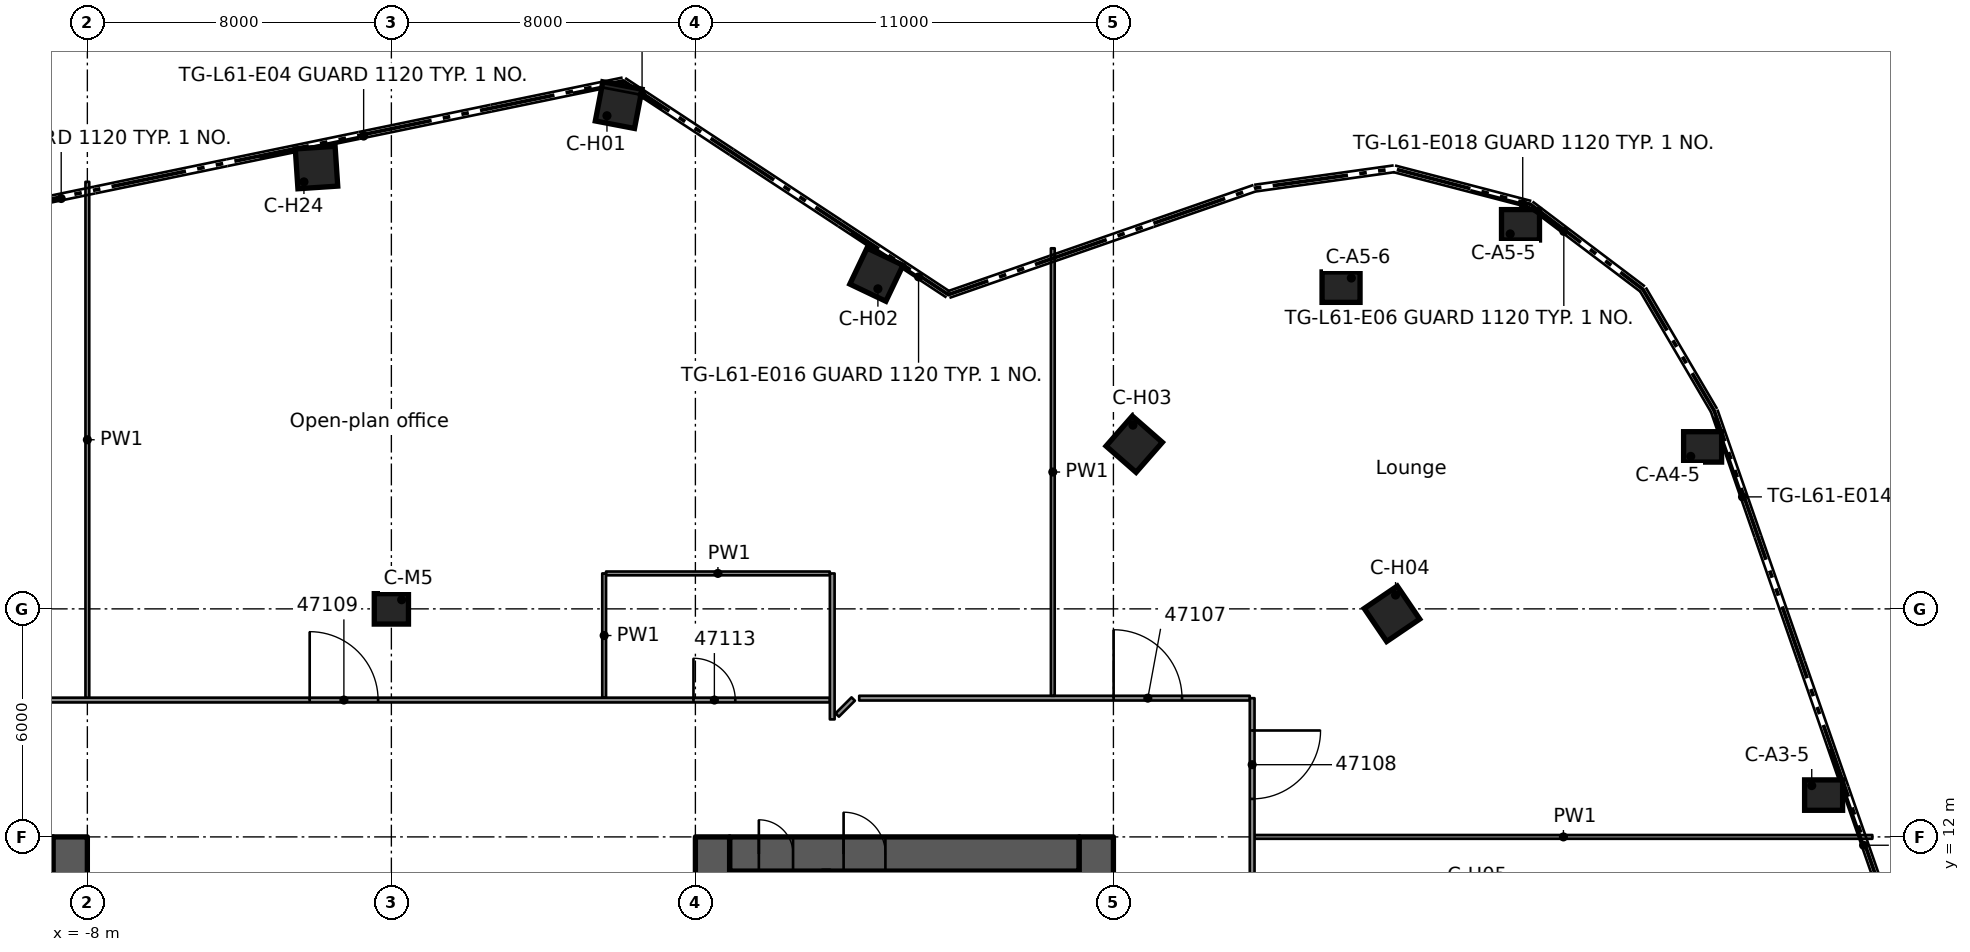
"""IFC4 building model, lengths in metres.
Left out: names, types, materials, properties, quantities, classifications, styles, units other than length and angle.
Written with IfcOpenShell. Run it as: python <this file> out.ifc"""

import sys

from ifc_helpers import new_model, si_unit, direction, frame, frame_2d, origin, origin_2d, place, context, subcontext, project, spatial, rectangle, extrude, element, fill, save


model = new_model("IFC4")
c1 = context("Model", 3, precision=1e-05, world=origin(), true_north=direction((0.0, 1.0)))
c2 = subcontext(c1, "Body", "Model", "MODEL_VIEW")
j1 = project(units=[si_unit("LENGTHUNIT", "METRE"), si_unit("PLANEANGLEUNIT", "RADIAN")], contexts=[c1])
p1 = place(None, origin())
s1 = spatial("IfcSite", under=j1, at=p1, CompositionType="ELEMENT")
p2 = place(p1, origin())
s2 = spatial("IfcBuilding", under=s1, at=p2, CompositionType="ELEMENT")
p3 = place(p2, frame((0.0, 0.0, 232.0)))
s3 = spatial("IfcBuildingStorey", under=s2, at=p3, CompositionType="ELEMENT", Elevation=232.0)
p4 = place(p3, frame((-18.1, 11.55, 0.0), z_axis=(0.0, 0.0, 1.0), x_axis=(1.0, 0.0, 0.0)))
e1 = element("IfcWall", 1, at=p4, inside=s3, PredefinedType="SHEAR", context=c2, shape_type="SweptSolid", body=[
    extrude(rectangle(XDim=9.2, YDim=0.9, at=frame_2d((4.6, 0.0))), origin(), (0.0, 0.0, 1.0), 3.5),
])
p5 = place(p4, frame((5.1, 0.0, 0.0)))
e2 = element("IfcOpeningElement", 2, at=p5, cuts=e1, PredefinedType="OPENING", context=c2, shape_type="SweptSolid", body=[
    extrude(rectangle(XDim=1.1, YDim=2.1, at=frame_2d((0.55, 1.05))), frame((0.0, 0.46, 0.0), z_axis=(0.0, -1.0, 0.0), x_axis=(1.0, 0.0, 0.0)), (0.0, 0.0, 1.0), 0.92),
])
p6 = place(p3, frame((-8.45, -12.0, 0.0), z_axis=(0.0, 0.0, 1.0), x_axis=(0.0, 1.0, 0.0)))
e3 = element("IfcWall", 3, at=p6, inside=s3, PredefinedType="SHEAR", context=c2, shape_type="SweptSolid", body=[
    extrude(rectangle(XDim=24.0, YDim=0.9, at=frame_2d((12.0, 0.0))), origin(), (0.0, 0.0, 1.0), 3.5),
])
p7 = place(p6, frame((9.6, 0.0, 0.0)))
e4 = element("IfcOpeningElement", 4, at=p7, cuts=e3, PredefinedType="OPENING", context=c2, shape_type="SweptSolid", body=[
    extrude(rectangle(XDim=1.8, YDim=2.1, at=frame_2d((0.9, 1.05))), frame((0.0, 0.46, 0.0), z_axis=(0.0, -1.0, 0.0), x_axis=(1.0, 0.0, 0.0)), (0.0, 0.0, 1.0), 0.92),
])
p8 = place(p6, frame((19.65, 0.0, 0.0)))
e5 = element("IfcOpeningElement", 5, at=p8, cuts=e3, PredefinedType="OPENING", context=c2, shape_type="SweptSolid", body=[
    extrude(rectangle(XDim=1.1, YDim=2.1, at=frame_2d((0.55, 1.05))), frame((0.0, 0.46, 0.0), z_axis=(0.0, -1.0, 0.0), x_axis=(1.0, 0.0, 0.0)), (0.0, 0.0, 1.0), 0.92),
])
p9 = place(p6, frame((2.2, 0.0, 0.0)))
e6 = element("IfcOpeningElement", 6, at=p9, cuts=e3, PredefinedType="OPENING", context=c2, shape_type="SweptSolid", body=[
    extrude(rectangle(XDim=0.8, YDim=2.1, at=frame_2d((0.4, 1.05))), frame((0.0, 0.46, 0.0), z_axis=(0.0, -1.0, 0.0), x_axis=(1.0, 0.0, 0.0)), (0.0, 0.0, 1.0), 0.92),
])
p10 = place(p3, frame((8.9, 11.55, 0.0), z_axis=(0.0, 0.0, 1.0), x_axis=(1.0, 0.0, 0.0)))
e7 = element("IfcWall", 7, at=p10, inside=s3, PredefinedType="SHEAR", context=c2, shape_type="SweptSolid", body=[
    extrude(rectangle(XDim=9.2, YDim=0.9, at=frame_2d((4.6, 0.0))), origin(), (0.0, 0.0, 1.0), 3.5),
])
p11 = place(p10, frame((3.0, 0.0, 0.0)))
e8 = element("IfcOpeningElement", 8, at=p11, cuts=e7, PredefinedType="OPENING", context=c2, shape_type="SweptSolid", body=[
    extrude(rectangle(XDim=1.1, YDim=2.1, at=frame_2d((0.55, 1.05))), frame((0.0, 0.46, 0.0), z_axis=(0.0, -1.0, 0.0), x_axis=(1.0, 0.0, 0.0)), (0.0, 0.0, 1.0), 0.92),
])
p12 = place(p10, frame((0.77, 0.0, 0.0)))
e9 = element("IfcOpeningElement", 9, at=p12, cuts=e7, PredefinedType="OPENING", context=c2, shape_type="SweptSolid", body=[
    extrude(rectangle(XDim=0.9, YDim=2.1, at=frame_2d((0.45, 1.05))), frame((0.0, 0.46, 0.0), z_axis=(0.0, -1.0, 0.0), x_axis=(1.0, 0.0, 0.0)), (0.0, 0.0, 1.0), 0.92),
])
p13 = place(p3, frame((8.45, -12.0, 0.0), z_axis=(0.0, 0.0, 1.0), x_axis=(0.0, 1.0, 0.0)))
e10 = element("IfcWall", 10, at=p13, inside=s3, PredefinedType="SHEAR", context=c2, shape_type="SweptSolid", body=[
    extrude(rectangle(XDim=24.0, YDim=0.9, at=frame_2d((12.0, 0.0))), origin(), (0.0, 0.0, 1.0), 3.5),
])
p14 = place(p13, frame((12.6, 0.0, 0.0)))
e11 = element("IfcOpeningElement", 11, at=p14, cuts=e10, PredefinedType="OPENING", context=c2, shape_type="SweptSolid", body=[
    extrude(rectangle(XDim=1.8, YDim=2.1, at=frame_2d((0.9, 1.05))), frame((0.0, 0.46, 0.0), z_axis=(0.0, -1.0, 0.0), x_axis=(1.0, 0.0, 0.0)), (0.0, 0.0, 1.0), 0.92),
])
p15 = place(p13, frame((3.25, 0.0, 0.0)))
e12 = element("IfcOpeningElement", 12, at=p15, cuts=e10, PredefinedType="OPENING", context=c2, shape_type="SweptSolid", body=[
    extrude(rectangle(XDim=1.1, YDim=2.1, at=frame_2d((0.55, 1.05))), frame((0.0, 0.46, 0.0), z_axis=(0.0, -1.0, 0.0), x_axis=(1.0, 0.0, 0.0)), (0.0, 0.0, 1.0), 0.92),
])
p16 = place(p13, frame((21.0, 0.0, 0.0)))
e13 = element("IfcOpeningElement", 13, at=p16, cuts=e10, PredefinedType="OPENING", context=c2, shape_type="SweptSolid", body=[
    extrude(rectangle(XDim=0.8, YDim=2.1, at=frame_2d((0.4, 1.05))), frame((0.0, 0.46, 0.0), z_axis=(0.0, -1.0, 0.0), x_axis=(1.0, 0.0, 0.0)), (0.0, 0.0, 1.0), 0.92),
])
p17 = place(p3, frame((18.55, -12.0, 0.0), z_axis=(0.0, 0.0, 1.0), x_axis=(0.0, 1.0, 0.0)))
e14 = element("IfcWall", 14, at=p17, inside=s3, PredefinedType="SHEAR", context=c2, shape_type="SweptSolid", body=[
    extrude(rectangle(XDim=24.0, YDim=0.9, at=frame_2d((12.0, 0.0))), origin(), (0.0, 0.0, 1.0), 3.5),
])
p18 = place(p17, frame((12.1, 0.0, 0.0)))
e15 = element("IfcOpeningElement", 15, at=p18, cuts=e14, PredefinedType="OPENING", context=c2, shape_type="SweptSolid", body=[
    extrude(rectangle(XDim=1.8, YDim=2.1, at=frame_2d((0.9, 1.05))), frame((0.0, 0.46, 0.0), z_axis=(0.0, -1.0, 0.0), x_axis=(1.0, 0.0, 0.0)), (0.0, 0.0, 1.0), 0.92),
])
for number, where, z_axis, x_axis in (
    (16, (37.688, 13.1, 0.0), (0.0, 0.0, 1.0), (1.0, 0.0, 0.0)),
    (17, (34.504, 22.262, 0.0), (0.0, 0.0, 1.0), (1.0, 0.0, 0.0)),
    (18, (29.712, 28.106, 0.0), (0.0, 0.0, 1.0), (1.0, 0.0, 0.0)),
    (19, (24.99, 26.465, 0.0), (0.0, 0.0, 1.0), (1.0, 0.0, 0.0)),
):
    element("IfcColumn", number, at=place(p3, frame(where, z_axis=z_axis, x_axis=x_axis)), inside=s3, PredefinedType="COLUMN", context=c2, shape_type="SweptSolid", body=[
        extrude(rectangle(XDim=1.0, YDim=0.8, at=origin_2d()), origin(), (0.0, 0.0, 1.0), 3.5),
    ])
for number, where, z_axis, x_axis in (
    (20, (5.981, 31.255, 0.0), (0.0, 0.0, 1.0), (0.188, 0.982, 0.0)),
    (21, (12.764, 26.794, 0.0), (0.0, 0.0, 1.0), (0.43, 0.903, 0.0)),
    (22, (19.547, 22.333, 0.0), (0.0, 0.0, 1.0), (0.659, 0.752, 0.0)),
    (23, (26.33, 17.871, 0.0), (0.0, 0.0, 1.0), (0.827, 0.562, 0.0)),
    (24, (-1.97, 29.613, 0.0), (0.0, 0.0, 1.0), (-0.066, 0.998, 0.0)),
):
    element("IfcColumn", number, at=place(p3, frame(where, z_axis=z_axis, x_axis=x_axis)), inside=s3, PredefinedType="COLUMN", context=c2, shape_type="SweptSolid", body=[
        extrude(rectangle(XDim=1.05, YDim=1.05, at=origin_2d()), origin(), (0.0, 0.0, 1.0), 3.5),
    ])
p19 = place(p3, frame((0.0, 18.0, 0.0), z_axis=(0.0, 0.0, 1.0), x_axis=(1.0, 0.0, 0.0)))
e25 = element("IfcColumn", 25, at=p19, inside=s3, PredefinedType="COLUMN", context=c2, shape_type="SweptSolid", body=[
    extrude(rectangle(XDim=0.9, YDim=0.8, at=origin_2d()), origin(), (0.0, 0.0, 1.0), 3.5),
])
p20 = place(p3, frame((11.44, 11.1, 0.0), z_axis=(0.0, 0.0, 1.0), x_axis=(0.0, -1.0, 0.0)))
e26 = element("IfcWall", 26, at=p20, inside=s3, PredefinedType="SOLIDWALL", context=c2, shape_type="SweptSolid", body=[
    extrude(rectangle(XDim=4.125, YDim=0.2, at=frame_2d((2.062, 0.0))), origin(), (0.0, 0.0, 1.0), 3.09),
])
p21 = place(p3, frame((22.713, 12.0, 0.0), z_axis=(0.0, 0.0, 1.0), x_axis=(1.0, 0.0, 0.0)))
e27 = element("IfcWall", 27, at=p21, inside=s3, PredefinedType="PARTITIONING", context=c2, shape_type="SweptSolid", body=[
    extrude(rectangle(XDim=16.257, YDim=0.1, at=frame_2d((8.128, 0.0))), origin(), (0.0, 0.0, 1.0), 3.08),
])
p22 = place(p3, frame((-11.537, 15.601, 0.0), z_axis=(0.0, 0.0, 1.0), x_axis=(1.0, 0.0, 0.0)))
e28 = element("IfcWall", 28, at=p22, inside=s3, PredefinedType="PARTITIONING", context=c2, shape_type="SweptSolid", body=[
    extrude(rectangle(XDim=23.074, YDim=0.125, at=frame_2d((11.537, 0.0))), origin(), (0.0, 0.0, 1.0), 3.08),
])
p23 = place(p22, frame((9.387, 0.0, 0.0)))
e29 = element("IfcOpeningElement", 29, at=p23, cuts=e28, PredefinedType="OPENING", context=c2, shape_type="SweptSolid", body=[
    extrude(rectangle(XDim=1.8, YDim=2.1, at=frame_2d((0.9, 1.05))), frame((0.0, 0.073, 0.0), z_axis=(0.0, -1.0, 0.0), x_axis=(1.0, 0.0, 0.0)), (0.0, 0.0, 1.0), 0.145),
])
p24 = place(p22, frame((19.487, 0.0, 0.0)))
e30 = element("IfcOpeningElement", 30, at=p24, cuts=e28, PredefinedType="OPENING", context=c2, shape_type="SweptSolid", body=[
    extrude(rectangle(XDim=1.1, YDim=2.1, at=frame_2d((0.55, 1.05))), frame((0.0, 0.073, 0.0), z_axis=(0.0, -1.0, 0.0), x_axis=(1.0, 0.0, 0.0)), (0.0, 0.0, 1.0), 0.145),
])
p25 = place(p3, frame((12.311, 15.651, 0.0), z_axis=(0.0, 0.0, 1.0), x_axis=(1.0, 0.0, 0.0)))
e31 = element("IfcWall", 31, at=p25, inside=s3, PredefinedType="PARTITIONING", context=c2, shape_type="SweptSolid", body=[
    extrude(rectangle(XDim=10.276, YDim=0.125, at=frame_2d((5.138, 0.0))), origin(), (0.0, 0.0, 1.0), 3.08),
])
p26 = place(p25, frame((6.694, 0.0, 0.0)))
e32 = element("IfcOpeningElement", 32, at=p26, cuts=e31, PredefinedType="OPENING", context=c2, shape_type="SweptSolid", body=[
    extrude(rectangle(XDim=1.8, YDim=2.1, at=frame_2d((0.9, 1.05))), frame((0.0, 0.073, 0.0), z_axis=(0.0, -1.0, 0.0), x_axis=(1.0, 0.0, 0.0)), (0.0, 0.0, 1.0), 0.145),
])
p27 = place(p3, frame((5.649, 18.933, 0.0), z_axis=(0.0, 0.0, 1.0), x_axis=(1.0, 0.0, 0.0)))
e33 = element("IfcWall", 33, at=p27, inside=s3, PredefinedType="PARTITIONING", context=c2, shape_type="SweptSolid", body=[
    extrude(rectangle(XDim=5.888, YDim=0.1, at=frame_2d((2.944, 0.0))), origin(), (0.0, 0.0, 1.0), 3.08),
])
p28 = place(p3, frame((11.732, 15.207, 0.0), z_axis=(0.0, 0.0, 1.0), x_axis=(0.707311769369, 0.706901733561, 0.0)))
e34 = element("IfcWall", 34, at=p28, inside=s3, PredefinedType="PARTITIONING", context=c2, shape_type="SweptSolid", body=[
    extrude(rectangle(XDim=0.595, YDim=0.125, at=frame_2d((0.298, 0.0))), origin(), (0.0, 0.0, 1.0), 3.08),
])
p29 = place(p3, frame((22.651, 15.65, 0.0), z_axis=(0.0, 0.0, 1.0), x_axis=(0.0, -1.0, 0.0)))
e35 = element("IfcWall", 35, at=p29, inside=s3, PredefinedType="PARTITIONING", context=c2, shape_type="SweptSolid", body=[
    extrude(rectangle(XDim=31.3, YDim=0.125, at=frame_2d((15.65, 0.0))), origin(), (0.0, 0.0, 1.0), 3.08),
])
p30 = place(p29, frame((25.25, 0.0, 0.0)))
e36 = element("IfcOpeningElement", 36, at=p30, cuts=e35, PredefinedType="OPENING", context=c2, shape_type="SweptSolid", body=[
    extrude(rectangle(XDim=0.9, YDim=2.1, at=frame_2d((0.45, 1.05))), frame((0.0, 0.073, 0.0), z_axis=(0.0, -1.0, 0.0), x_axis=(1.0, 0.0, 0.0)), (0.0, 0.0, 1.0), 0.145),
])
p31 = place(p29, frame((21.25, 0.0, 0.0)))
e37 = element("IfcOpeningElement", 37, at=p31, cuts=e35, PredefinedType="OPENING", context=c2, shape_type="SweptSolid", body=[
    extrude(rectangle(XDim=0.9, YDim=2.1, at=frame_2d((0.45, 1.05))), frame((0.0, 0.073, 0.0), z_axis=(0.0, -1.0, 0.0), x_axis=(1.0, 0.0, 0.0)), (0.0, 0.0, 1.0), 0.145),
])
p32 = place(p29, frame((9.25, 0.0, 0.0)))
e38 = element("IfcOpeningElement", 38, at=p32, cuts=e35, PredefinedType="OPENING", context=c2, shape_type="SweptSolid", body=[
    extrude(rectangle(XDim=0.9, YDim=2.1, at=frame_2d((0.45, 1.05))), frame((0.0, 0.073, 0.0), z_axis=(0.0, -1.0, 0.0), x_axis=(1.0, 0.0, 0.0)), (0.0, 0.0, 1.0), 0.145),
])
p33 = place(p29, frame((0.85, 0.0, 0.0)))
e39 = element("IfcOpeningElement", 39, at=p33, cuts=e35, PredefinedType="OPENING", context=c2, shape_type="SweptSolid", body=[
    extrude(rectangle(XDim=1.8, YDim=2.1, at=frame_2d((0.9, 1.05))), frame((0.0, 0.073, 0.0), z_axis=(0.0, -1.0, 0.0), x_axis=(1.0, 0.0, 0.0)), (0.0, 0.0, 1.0), 0.145),
])
p34 = place(p3, frame((17.405, 15.713, 0.0), z_axis=(0.0, 0.0, 1.0), x_axis=(0.0, 1.0, 0.0)))
e40 = element("IfcWall", 40, at=p34, inside=s3, PredefinedType="PARTITIONING", context=c2, shape_type="SweptSolid", body=[
    extrude(rectangle(XDim=11.775, YDim=0.1, at=frame_2d((5.888, 0.0))), origin(), (0.0, 0.0, 1.0), 3.08),
])
p35 = place(p3, frame((11.601, 15.092, 0.0), z_axis=(0.0, 0.0, 1.0), x_axis=(0.0, 1.0, 0.0)))
e41 = element("IfcWall", 41, at=p35, inside=s3, PredefinedType="PARTITIONING", context=c2, shape_type="SweptSolid", body=[
    extrude(rectangle(XDim=3.84, YDim=0.125, at=frame_2d((1.92, 0.0))), origin(), (0.0, 0.0, 1.0), 3.08),
])
p36 = place(p3, frame((5.599, 15.664, 0.0), z_axis=(0.0, 0.0, 1.0), x_axis=(0.0, 1.0, 0.0)))
e42 = element("IfcWall", 42, at=p36, inside=s3, PredefinedType="PARTITIONING", context=c2, shape_type="SweptSolid", body=[
    extrude(rectangle(XDim=3.269, YDim=0.1, at=frame_2d((1.635, 0.0))), origin(), (0.0, 0.0, 1.0), 3.08),
])
p37 = place(p3, frame((-8.0, 15.664, 0.0), z_axis=(0.0, 0.0, 1.0), x_axis=(0.0, 1.0, 0.0)))
e43 = element("IfcWall", 43, at=p37, inside=s3, PredefinedType="PARTITIONING", context=c2, shape_type="SweptSolid", body=[
    extrude(rectangle(XDim=13.572, YDim=0.1, at=frame_2d((6.786, 0.0))), origin(), (0.0, 0.0, 1.0), 3.08),
])
p38 = place(p11, origin())
e44 = element("IfcDoor", 44, at=p38, inside=s3, OperationType="SINGLE_SWING_LEFT", PredefinedType="DOOR", context=c2, shape_type="SweptSolid", body=[
    extrude(rectangle(XDim=1.1, YDim=2.1, at=frame_2d((0.55, 1.05))), frame((0.0, 0.025, 0.0), z_axis=(0.0, -1.0, 0.0), x_axis=(1.0, 0.0, 0.0)), (0.0, 0.0, 1.0), 0.05),
])
fill(e8, e44)
p39 = place(p12, origin())
e45 = element("IfcDoor", 45, at=p39, inside=s3, OperationType="SINGLE_SWING_LEFT", PredefinedType="DOOR", context=c2, shape_type="SweptSolid", body=[
    extrude(rectangle(XDim=0.9, YDim=2.1, at=frame_2d((0.45, 1.05))), frame((0.0, 0.025, 0.0), z_axis=(0.0, -1.0, 0.0), x_axis=(1.0, 0.0, 0.0)), (0.0, 0.0, 1.0), 0.05),
])
fill(e9, e45)
p40 = place(p26, origin())
e46 = element("IfcDoor", 46, at=p40, inside=s3, OperationType="DOUBLE_DOOR_SINGLE_SWING", PredefinedType="DOOR", context=c2, shape_type="SweptSolid", body=[
    extrude(rectangle(XDim=1.8, YDim=2.1, at=frame_2d((0.9, 1.05))), frame((0.0, 0.025, 0.0), z_axis=(0.0, -1.0, 0.0), x_axis=(1.0, 0.0, 0.0)), (0.0, 0.0, 1.0), 0.05),
])
fill(e32, e46)
p41 = place(p33, origin())
e47 = element("IfcDoor", 47, at=p41, inside=s3, OperationType="DOUBLE_DOOR_SINGLE_SWING", PredefinedType="DOOR", context=c2, shape_type="SweptSolid", body=[
    extrude(rectangle(XDim=1.8, YDim=2.1, at=frame_2d((0.9, 1.05))), frame((0.0, 0.025, 0.0), z_axis=(0.0, -1.0, 0.0), x_axis=(1.0, 0.0, 0.0)), (0.0, 0.0, 1.0), 0.05),
])
fill(e39, e47)
p42 = place(p23, origin())
e48 = element("IfcDoor", 48, at=p42, inside=s3, OperationType="DOUBLE_DOOR_SINGLE_SWING", PredefinedType="DOOR", context=c2, shape_type="SweptSolid", body=[
    extrude(rectangle(XDim=1.8, YDim=2.1, at=frame_2d((0.9, 1.05))), frame((0.0, 0.025, 0.0), z_axis=(0.0, -1.0, 0.0), x_axis=(1.0, 0.0, 0.0)), (0.0, 0.0, 1.0), 0.05),
])
fill(e29, e48)
p43 = place(p24, origin())
e49 = element("IfcDoor", 49, at=p43, inside=s3, OperationType="SINGLE_SWING_RIGHT", PredefinedType="DOOR", context=c2, shape_type="SweptSolid", body=[
    extrude(rectangle(XDim=1.1, YDim=2.1, at=frame_2d((0.55, 1.05))), frame((0.0, 0.025, 0.0), z_axis=(0.0, -1.0, 0.0), x_axis=(1.0, 0.0, 0.0)), (0.0, 0.0, 1.0), 0.05),
])
fill(e30, e49)
save(model, sys.argv[1])
